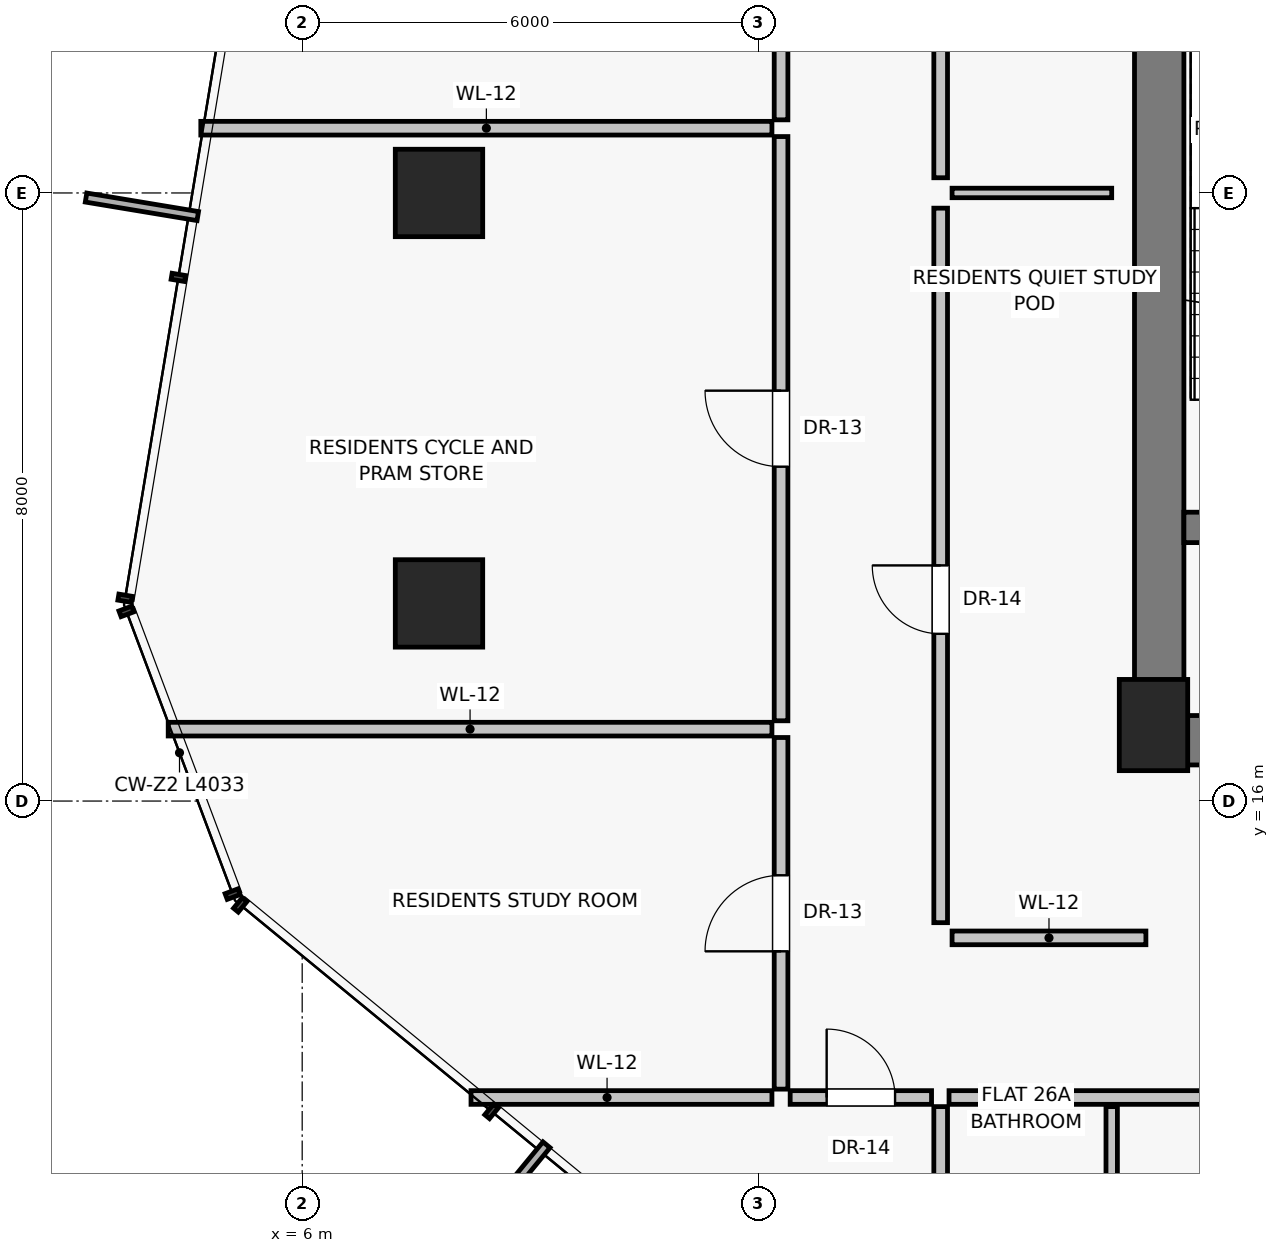
"""IFC4 building model, lengths in metres.
Left out: names, types, materials, properties, quantities, classifications, styles, units other than length and angle.
Written with IfcOpenShell. Run it as: python <this file> out.ifc"""

import sys

from ifc_helpers import new_model, si_unit, direction, frame, frame_2d, origin, origin_2d, place, context, subcontext, project, spatial, rectangle, extrude, source, transform, mapped, element, fill, save


model = new_model("IFC4")
c1 = context("Model", 3, precision=1e-05, world=origin(), true_north=direction((0.0, 1.0)))
c2 = subcontext(c1, "Body", "Model", "MODEL_VIEW")
j1 = project(units=[si_unit("LENGTHUNIT", "METRE"), si_unit("PLANEANGLEUNIT", "RADIAN")], contexts=[c1])
p1 = place(None, origin())
s1 = spatial("IfcSite", under=j1, at=p1, CompositionType="ELEMENT")
p2 = place(p1, origin())
s2 = spatial("IfcBuilding", under=s1, at=p2, CompositionType="ELEMENT")
p3 = place(p2, frame((0.0, 0.0, 95.95)))
s3 = spatial("IfcBuildingStorey", under=s2, at=p3, CompositionType="ELEMENT", Elevation=95.95)
p4 = place(p3, frame((17.2, 17.0, 0.0), z_axis=(0.0, 0.0, 1.0), x_axis=(1.0, 0.0, 0.0)))
e1 = element("IfcColumn", 1, at=p4, inside=s3, PredefinedType="PILASTER", context=c2, shape_type="SweptSolid", body=[
    extrude(rectangle(XDim=0.9, YDim=1.2, at=origin_2d()), origin(), (0.0, 0.0, 1.0), 3.25),
])
for number, where, z_axis, x_axis in (
    (2, (7.8, 24.0, 0.0), (0.0, 0.0, 1.0), (1.0, 0.0, 0.0)),
    (3, (7.8, 18.6, 0.0), (0.0, 0.0, 1.0), (1.0, 0.0, 0.0)),
):
    element("IfcColumn", number, at=place(p3, frame(where, z_axis=z_axis, x_axis=x_axis)), inside=s3, PredefinedType="COLUMN", context=c2, shape_type="SweptSolid", body=[
        extrude(rectangle(XDim=1.15, YDim=1.15, at=origin_2d()), origin(), (0.0, 0.0, 1.0), 3.25),
    ])
p5 = place(p3, frame((17.275, 16.8, 0.0), z_axis=(0.0, 0.0, 1.0), x_axis=(0.0, 1.0, 0.0)))
e4 = element("IfcWall", 4, at=p5, inside=s3, PredefinedType="SHEAR", context=c2, shape_type="SweptSolid", body=[
    extrude(rectangle(XDim=14.2, YDim=0.65, at=frame_2d((7.1, 0.0))), origin(), (0.0, 0.0, 1.0), 3.0),
])
p6 = place(p3, frame((17.2, 16.8, 0.0), z_axis=(0.0, 0.0, 1.0), x_axis=(1.0, 0.0, 0.0)))
e5 = element("IfcWall", 5, at=p6, inside=s3, PredefinedType="SHEAR", context=c2, shape_type="SweptSolid", body=[
    extrude(rectangle(XDim=5.85, YDim=0.65, at=frame_2d((2.925, 0.0))), origin(), (0.0, 0.0, 1.0), 3.0),
])
p7 = place(p6, frame((1.15, 0.0, 0.0)))
e6 = element("IfcOpeningElement", 6, at=p7, cuts=e5, PredefinedType="OPENING", context=c2, shape_type="SweptSolid", body=[
    extrude(rectangle(XDim=1.2, YDim=2.03, at=frame_2d((0.6, 1.015))), frame((0.0, 0.335, 0.0), z_axis=(0.0, -1.0, 0.0), x_axis=(1.0, 0.0, 0.0)), (0.0, 0.0, 1.0), 0.67),
])
p8 = place(p3, frame((17.6, 19.6, 0.0), z_axis=(0.0, 0.0, 1.0), x_axis=(1.0, 0.0, 0.0)))
e7 = element("IfcWall", 7, at=p8, inside=s3, PredefinedType="SHEAR", context=c2, shape_type="SweptSolid", body=[
    extrude(rectangle(XDim=3.4, YDim=0.4, at=frame_2d((1.7, 0.0))), origin(), (0.0, 0.0, 1.0), 3.0),
])
p9 = place(p8, frame((1.05, 0.0, 0.0)))
e8 = element("IfcOpeningElement", 8, at=p9, cuts=e7, PredefinedType="OPENING", context=c2, shape_type="SweptSolid", body=[
    extrude(rectangle(XDim=1.1, YDim=2.03, at=frame_2d((0.55, 1.015))), frame((0.0, 0.21, 0.0), z_axis=(0.0, -1.0, 0.0), x_axis=(1.0, 0.0, 0.0)), (0.0, 0.0, 1.0), 0.42),
])
p10 = place(p3, frame((14.4, 14.4, 0.0), z_axis=(0.0, 0.0, 1.0), x_axis=(0.0, 1.0, 0.0)))
e9 = element("IfcWall", 9, at=p10, inside=s3, PredefinedType="PARTITIONING", context=c2, shape_type="SweptSolid", body=[
    extrude(rectangle(XDim=9.4, YDim=0.18, at=frame_2d((4.7, 0.0))), origin(), (0.0, 0.0, 1.0), 3.0),
])
p11 = place(p10, frame((3.8, 0.0, 0.0)))
e10 = element("IfcOpeningElement", 10, at=p11, cuts=e9, PredefinedType="OPENING", context=c2, shape_type="SweptSolid", body=[
    extrude(rectangle(XDim=0.9, YDim=2.01, at=frame_2d((0.45, 1.005))), frame((0.0, 0.1, 0.0), z_axis=(0.0, -1.0, 0.0), x_axis=(1.0, 0.0, 0.0)), (0.0, 0.0, 1.0), 0.2),
])
p12 = place(p3, frame((14.4, 24.2, 0.0), z_axis=(0.0, 0.0, 1.0), x_axis=(0.0, 1.0, 0.0)))
e11 = element("IfcWall", 11, at=p12, inside=s3, PredefinedType="PARTITIONING", context=c2, shape_type="SweptSolid", body=[
    extrude(rectangle(XDim=9.2, YDim=0.18, at=frame_2d((4.6, 0.0))), origin(), (0.0, 0.0, 1.0), 3.0),
])
p13 = place(p12, frame((3.8, 0.0, 0.0)))
e12 = element("IfcOpeningElement", 12, at=p13, cuts=e11, PredefinedType="OPENING", context=c2, shape_type="SweptSolid", body=[
    extrude(rectangle(XDim=0.9, YDim=2.01, at=frame_2d((0.45, 1.005))), frame((0.0, 0.1, 0.0), z_axis=(0.0, -1.0, 0.0), x_axis=(1.0, 0.0, 0.0)), (0.0, 0.0, 1.0), 0.2),
])
p14 = place(p3, frame((14.55, 24.0, 0.0), z_axis=(0.0, 0.0, 1.0), x_axis=(1.0, 0.0, 0.0)))
e13 = element("IfcWall", 13, at=p14, inside=s3, PredefinedType="PARTITIONING", context=c2, shape_type="SweptSolid", body=[
    extrude(rectangle(XDim=2.1, YDim=0.125, at=frame_2d((1.05, 0.0))), origin(), (0.0, 0.0, 1.0), 3.0),
])
p15 = place(p3, frame((14.55, 14.2, 0.0), z_axis=(0.0, 0.0, 1.0), x_axis=(1.0, 0.0, 0.0)))
e14 = element("IfcWall", 14, at=p15, inside=s3, PredefinedType="PARTITIONING", context=c2, shape_type="SweptSolid", body=[
    extrude(rectangle(XDim=2.55, YDim=0.18, at=frame_2d((1.275, 0.0))), origin(), (0.0, 0.0, 1.0), 3.0),
])
p16 = place(p3, frame((14.4, 11.98, 0.0), z_axis=(0.0, 0.0, 1.0), x_axis=(0.0, -1.0, 0.0)))
e15 = element("IfcWall", 15, at=p16, inside=s3, PredefinedType="PARTITIONING", context=c2, shape_type="SweptSolid", body=[
    extrude(rectangle(XDim=4.959, YDim=0.18, at=frame_2d((2.479, 0.0))), origin(), (0.0, 0.0, 1.0), 3.0),
])
p17 = place(p3, frame((14.51, 12.1, 0.0), z_axis=(0.0, 0.0, 1.0), x_axis=(1.0, 0.0, 0.0)))
e16 = element("IfcWall", 16, at=p17, inside=s3, PredefinedType="PARTITIONING", context=c2, shape_type="SweptSolid", body=[
    extrude(rectangle(XDim=10.024, YDim=0.18, at=frame_2d((5.012, 0.0))), origin(), (0.0, 0.0, 1.0), 2.58),
])
p18 = place(p17, frame((3.408, 0.0, 0.0)))
e17 = element("IfcOpeningElement", 17, at=p18, cuts=e16, PredefinedType="OPENING", context=c2, shape_type="SweptSolid", body=[
    extrude(rectangle(XDim=0.95, YDim=2.02, at=frame_2d((0.475, 1.01))), frame((0.0, 0.1, 0.0), z_axis=(0.0, -1.0, 0.0), x_axis=(1.0, 0.0, 0.0)), (0.0, 0.0, 1.0), 0.2),
])
p19 = place(p3, frame((16.65, 11.98, 0.0), z_axis=(0.0, 0.0, 1.0), x_axis=(0.0, -1.0, 0.0)))
e18 = element("IfcWall", 18, at=p19, inside=s3, PredefinedType="PARTITIONING", context=c2, shape_type="SweptSolid", body=[
    extrude(rectangle(XDim=1.8, YDim=0.15, at=frame_2d((0.9, 0.0))), origin(), (0.0, 0.0, 1.0), 3.0),
])
p20 = place(p3, frame((12.18, 12.1, 0.0), z_axis=(0.0, 0.0, 1.0), x_axis=(-1.0, 0.0, 0.0)))
e19 = element("IfcWall", 19, at=p20, inside=s3, PredefinedType="PARTITIONING", context=c2, shape_type="SweptSolid", body=[
    extrude(rectangle(XDim=3.959, YDim=0.18, at=frame_2d((1.979, 0.0))), origin(), (0.0, 0.0, 1.0), 3.0),
])
p21 = place(p3, frame((12.3, 12.21, 0.0), z_axis=(0.0, 0.0, 1.0), x_axis=(0.0, 1.0, 0.0)))
e20 = element("IfcWall", 20, at=p21, inside=s3, PredefinedType="PARTITIONING", context=c2, shape_type="SweptSolid", body=[
    extrude(rectangle(XDim=4.626, YDim=0.18, at=frame_2d((2.313, 0.0))), origin(), (0.0, 0.0, 1.0), 3.0),
])
p22 = place(p21, frame((1.813, 0.0, 0.0)))
e21 = element("IfcOpeningElement", 21, at=p22, cuts=e20, PredefinedType="OPENING", context=c2, shape_type="SweptSolid", body=[
    extrude(rectangle(XDim=1.0, YDim=2.01, at=frame_2d((0.5, 1.005))), frame((0.0, 0.1, 0.0), z_axis=(0.0, -1.0, 0.0), x_axis=(1.0, 0.0, 0.0)), (0.0, 0.0, 1.0), 0.2),
])
p23 = place(p3, frame((12.3, 17.056, 0.0), z_axis=(0.0, 0.0, 1.0), x_axis=(0.0, 1.0, 0.0)))
e22 = element("IfcWall", 22, at=p23, inside=s3, PredefinedType="PARTITIONING", context=c2, shape_type="SweptSolid", body=[
    extrude(rectangle(XDim=7.686, YDim=0.18, at=frame_2d((3.843, 0.0))), origin(), (0.0, 0.0, 1.0), 2.58),
])
p24 = place(p23, frame((3.343, 0.0, 0.0)))
e23 = element("IfcOpeningElement", 23, at=p24, cuts=e22, PredefinedType="OPENING", context=c2, shape_type="SweptSolid", body=[
    extrude(rectangle(XDim=1.0, YDim=2.01, at=frame_2d((0.5, 1.005))), frame((0.0, 0.1, 0.0), z_axis=(0.0, -1.0, 0.0), x_axis=(1.0, 0.0, 0.0)), (0.0, 0.0, 1.0), 0.2),
])
p25 = place(p3, frame((12.18, 16.946, 0.0), z_axis=(0.0, 0.0, 1.0), x_axis=(-1.0, 0.0, 0.0)))
e24 = element("IfcWall", 24, at=p25, inside=s3, PredefinedType="PARTITIONING", context=c2, shape_type="SweptSolid", body=[
    extrude(rectangle(XDim=7.943, YDim=0.18, at=frame_2d((3.971, 0.0))), origin(), (0.0, 0.0, 1.0), 3.0),
])
p26 = place(p3, frame((12.18, 24.852, 0.0), z_axis=(0.0, 0.0, 1.0), x_axis=(-1.0, 0.0, 0.0)))
e25 = element("IfcWall", 25, at=p26, inside=s3, PredefinedType="PARTITIONING", context=c2, shape_type="SweptSolid", body=[
    extrude(rectangle(XDim=7.514, YDim=0.18, at=frame_2d((3.757, 0.0))), origin(), (0.0, 0.0, 1.0), 3.0),
])
p27 = place(p3, frame((12.3, 24.962, 0.0), z_axis=(0.0, 0.0, 1.0), x_axis=(0.0, 1.0, 0.0)))
e26 = element("IfcWall", 26, at=p27, inside=s3, PredefinedType="PARTITIONING", context=c2, shape_type="SweptSolid", body=[
    extrude(rectangle(XDim=3.902, YDim=0.18, at=frame_2d((1.951, 0.0))), origin(), (0.0, 0.0, 1.0), 2.58),
])
p28 = place(p27, frame((1.451, 0.0, 0.0)))
e27 = element("IfcOpeningElement", 27, at=p28, cuts=e26, PredefinedType="OPENING", context=c2, shape_type="SweptSolid", body=[
    extrude(rectangle(XDim=1.0, YDim=2.01, at=frame_2d((0.5, 1.005))), frame((0.0, 0.1, 0.0), z_axis=(0.0, -1.0, 0.0), x_axis=(1.0, 0.0, 0.0)), (0.0, 0.0, 1.0), 0.2),
])
p29 = place(p3, frame((12.42, 12.1, 0.0), z_axis=(0.0, 0.0, 1.0), x_axis=(1.0, 0.0, 0.0)))
e28 = element("IfcWall", 28, at=p29, inside=s3, PredefinedType="PARTITIONING", context=c2, shape_type="SweptSolid", body=[
    extrude(rectangle(XDim=1.86, YDim=0.18, at=frame_2d((0.93, 0.0))), origin(), (0.0, 0.0, 1.0), 3.0),
])
p30 = place(p29, frame((0.48, 0.0, 0.0)))
e29 = element("IfcOpeningElement", 29, at=p30, cuts=e28, PredefinedType="OPENING", context=c2, shape_type="SweptSolid", body=[
    extrude(rectangle(XDim=0.9, YDim=2.01, at=frame_2d((0.45, 1.005))), frame((0.0, 0.1, 0.0), z_axis=(0.0, -1.0, 0.0), x_axis=(1.0, 0.0, 0.0)), (0.0, 0.0, 1.0), 0.2),
])
m1 = source(origin(), c2, "Body", "SweptSolid", [
    extrude(rectangle(XDim=0.9, YDim=2.01, at=frame_2d((0.45, 1.005))), frame((0.0, 0.025, 0.0), z_axis=(0.0, -1.0, 0.0), x_axis=(1.0, 0.0, 0.0)), (0.0, 0.0, 1.0), 0.05),
])
p31 = place(p11, origin())
e30 = element("IfcDoor", 30, at=p31, inside=s3, OperationType="SINGLE_SWING_RIGHT", PredefinedType="DOOR", context=c2, shape_type="MappedRepresentation", body=[
    mapped(m1, transform((0.0, 0.0, 0.0), scale=1.0)),
])
fill(e10, e30)
m2 = source(origin(), c2, "Body", "SweptSolid", [
    extrude(rectangle(XDim=1.0, YDim=2.01, at=frame_2d((0.5, 1.005))), frame((0.0, 0.025, 0.0), z_axis=(0.0, -1.0, 0.0), x_axis=(1.0, 0.0, 0.0)), (0.0, 0.0, 1.0), 0.05),
])
p32 = place(p22, origin())
e31 = element("IfcDoor", 31, at=p32, inside=s3, OperationType="SINGLE_SWING_LEFT", PredefinedType="DOOR", context=c2, shape_type="MappedRepresentation", body=[
    mapped(m2, transform((0.0, 0.0, 0.0), scale=1.0)),
])
fill(e21, e31)
p33 = place(p24, origin())
e32 = element("IfcDoor", 32, at=p33, inside=s3, OperationType="SINGLE_SWING_RIGHT", PredefinedType="DOOR", context=c2, shape_type="MappedRepresentation", body=[
    mapped(m2, transform((0.0, 0.0, 0.0), scale=1.0)),
])
fill(e23, e32)
p34 = place(p30, origin())
e33 = element("IfcDoor", 33, at=p34, inside=s3, OperationType="SINGLE_SWING_LEFT", PredefinedType="DOOR", context=c2, shape_type="MappedRepresentation", body=[
    mapped(m1, transform((0.0, 0.0, 0.0), scale=1.0)),
])
fill(e29, e33)
save(model, sys.argv[1])
